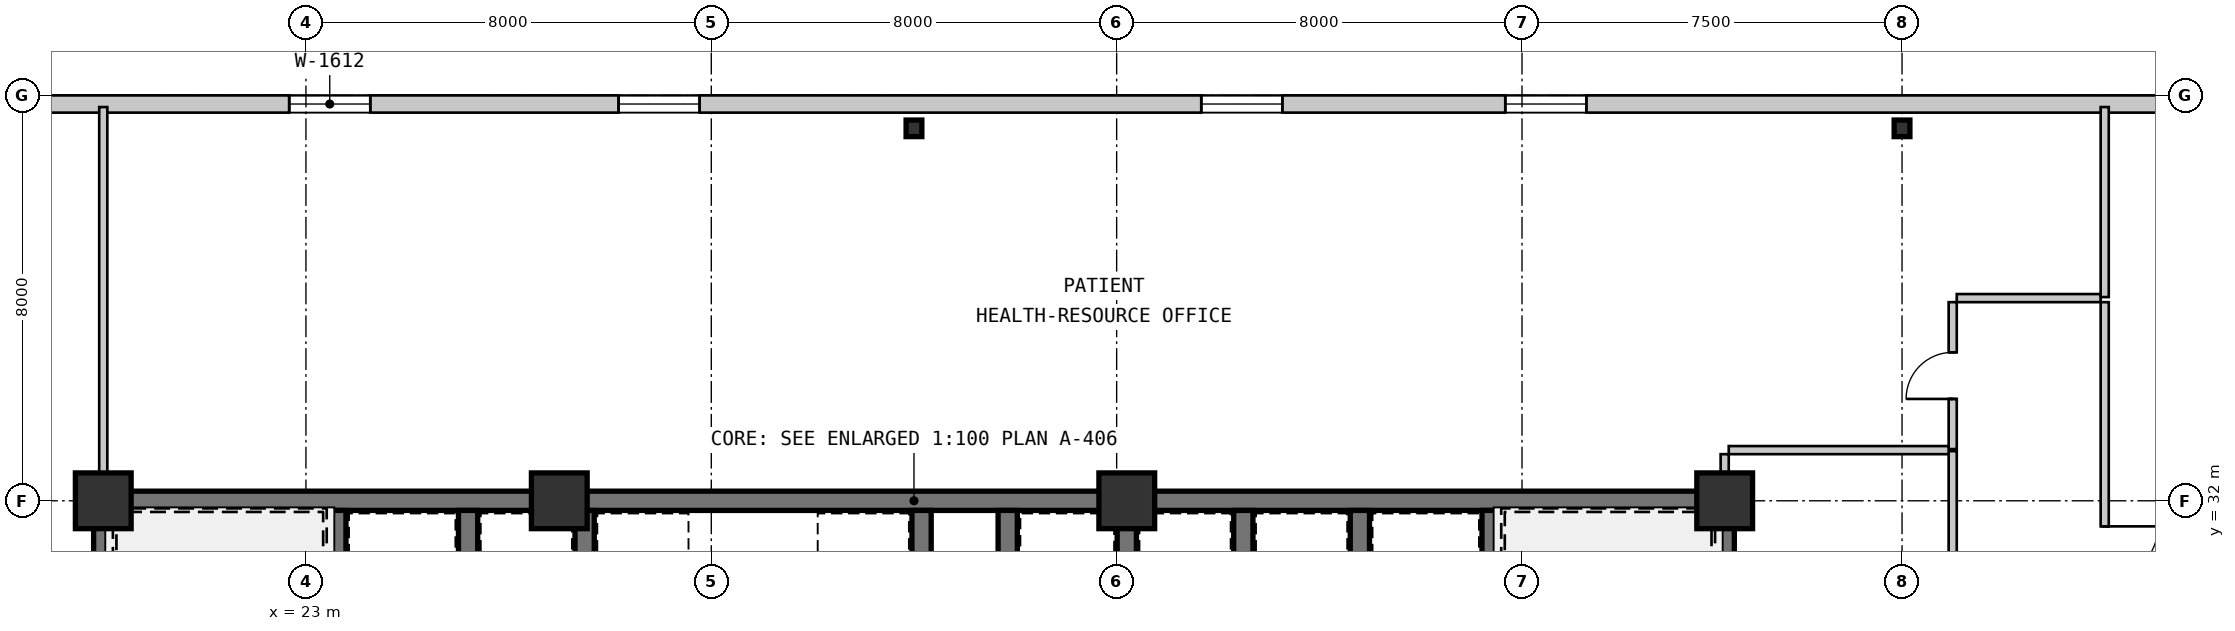
"""IFC4 building model, lengths in metres.
Left out: names, types, materials, properties, quantities, classifications, styles, units other than length and angle.
Written with IfcOpenShell. Run it as: python <this file> out.ifc"""

import sys

from ifc_helpers import new_model, si_unit, direction, frame, frame_2d, origin, origin_2d, place, context, subcontext, project, spatial, rectangle, i_section, extrude, source, transform, mapped, element, fill, save


model = new_model("IFC4")
c1 = context("Model", 3, precision=1e-05, world=origin(), true_north=direction((0.0, 1.0)))
c2 = subcontext(c1, "Body", "Model", "MODEL_VIEW")
j1 = project(units=[si_unit("LENGTHUNIT", "METRE"), si_unit("PLANEANGLEUNIT", "RADIAN")], contexts=[c1])
p1 = place(None, origin())
s1 = spatial("IfcSite", under=j1, at=p1, CompositionType="ELEMENT")
p2 = place(p1, origin())
s2 = spatial("IfcBuilding", under=s1, at=p2, CompositionType="ELEMENT")
p3 = place(p2, frame((0.0, 0.0, 12.95)))
s3 = spatial("IfcBuildingStorey", under=s2, at=p3, CompositionType="ELEMENT", Elevation=12.95)
m1 = source(origin(), c2, "Body", "SweptSolid", [
    extrude(rectangle(XDim=1.1, YDim=1.1, at=origin_2d()), origin(), (0.0, 0.0, 1.0), 3.85),
])
for number, where, z_axis, x_axis in (
    (1, (19.0, 32.0, 0.0), (0.0, 0.0, 1.0), (1.0, 0.0, 0.0)),
    (2, (28.0, 32.0, 0.0), (0.0, 0.0, 1.0), (1.0, 0.0, 0.0)),
    (3, (39.2, 32.0, 0.0), (0.0, 0.0, 1.0), (1.0, 0.0, 0.0)),
    (4, (51.0, 32.0, 0.0), (0.0, 0.0, 1.0), (1.0, 0.0, 0.0)),
):
    element("IfcColumn", number, at=place(p3, frame(where, z_axis=z_axis, x_axis=x_axis)), inside=s3, PredefinedType="COLUMN", context=c2, shape_type="MappedRepresentation", body=[
        mapped(m1, transform((0.0, 0.0, 0.0), scale=1.0)),
    ])
m2 = source(origin(), c2, "Body", "SweptSolid", [
    extrude(i_section(OverallWidth=0.311, OverallDepth=0.327, WebThickness=0.016, FlangeThickness=0.025, at=origin_2d()), origin(), (0.0, 0.0, 1.0), 3.85),
])
for number, where, z_axis, x_axis in (
    (5, (35.0, 39.35, 0.0), (0.0, 0.0, 1.0), (1.0, 0.0, 0.0)),
    (6, (54.5, 39.35, 0.0), (0.0, 0.0, 1.0), (1.0, 0.0, 0.0)),
):
    element("IfcColumn", number, at=place(p3, frame(where, z_axis=z_axis, x_axis=x_axis)), inside=s3, PredefinedType="COLUMN", context=c2, shape_type="MappedRepresentation", body=[
        mapped(m2, transform((0.0, 0.0, 0.0), scale=1.0)),
    ])
m3 = source(origin(), c2, "Body", "SweptSolid", [
    extrude(rectangle(XDim=69.66, YDim=0.34, at=frame_2d((34.83, 0.0))), origin(), (0.0, 0.0, 1.0), 3.43),
])
p4 = place(p3, frame((0.17, 39.83, 0.0), z_axis=(0.0, 0.0, 1.0), x_axis=(1.0, 0.0, 0.0)))
e7 = element("IfcWall", 7, at=p4, inside=s3, PredefinedType="SOLIDWALL", context=c2, shape_type="MappedRepresentation", body=[
    mapped(m3, transform((0.0, 0.0, 0.0), scale=1.0)),
])
m4 = source(origin(), c2, "Body", "SweptSolid", [
    extrude(rectangle(XDim=1.6, YDim=1.2, at=frame_2d((0.8, 0.6))), frame((0.0, 0.18, 0.0), z_axis=(0.0, -1.0, 0.0), x_axis=(1.0, 0.0, 0.0)), (0.0, 0.0, 1.0), 0.36),
])
p5 = place(p4, frame((4.5, 0.0, 0.55)))
e8 = element("IfcOpeningElement", 8, at=p5, cuts=e7, PredefinedType="OPENING", context=c2, shape_type="MappedRepresentation", body=[
    mapped(m4, transform((0.0, 0.0, 0.0), scale=1.0)),
])
p6 = place(p4, frame((22.5, 0.0, 0.55)))
e9 = element("IfcOpeningElement", 9, at=p6, cuts=e7, PredefinedType="OPENING", context=c2, shape_type="MappedRepresentation", body=[
    mapped(m4, transform((0.0, 0.0, 0.0), scale=1.0)),
])
p7 = place(p4, frame((29.0, 0.0, 0.55)))
e10 = element("IfcOpeningElement", 10, at=p7, cuts=e7, PredefinedType="OPENING", context=c2, shape_type="MappedRepresentation", body=[
    mapped(m4, transform((0.0, 0.0, 0.0), scale=1.0)),
])
p8 = place(p4, frame((40.5, 0.0, 0.55)))
e11 = element("IfcOpeningElement", 11, at=p8, cuts=e7, PredefinedType="OPENING", context=c2, shape_type="MappedRepresentation", body=[
    mapped(m4, transform((0.0, 0.0, 0.0), scale=1.0)),
])
p9 = place(p4, frame((46.5, 0.0, 0.55)))
e12 = element("IfcOpeningElement", 12, at=p9, cuts=e7, PredefinedType="OPENING", context=c2, shape_type="MappedRepresentation", body=[
    mapped(m4, transform((0.0, 0.0, 0.0), scale=1.0)),
])
p10 = place(p4, frame((62.5, 0.0, 0.55)))
e13 = element("IfcOpeningElement", 13, at=p10, cuts=e7, PredefinedType="OPENING", context=c2, shape_type="MappedRepresentation", body=[
    mapped(m4, transform((0.0, 0.0, 0.0), scale=1.0)),
])
m5 = source(origin(), c2, "Body", "SweptSolid", [
    extrude(rectangle(XDim=9.19, YDim=0.38, at=frame_2d((4.595, 0.0))), origin(), (0.0, 0.0, 1.0), 3.43),
])
p11 = place(p3, frame((18.81, 32.0, 0.0), z_axis=(0.0, 0.0, 1.0), x_axis=(1.0, 0.0, 0.0)))
e14 = element("IfcWall", 14, at=p11, inside=s3, PredefinedType="SHEAR", context=c2, shape_type="MappedRepresentation", body=[
    mapped(m5, transform((0.0, 0.0, 0.0), scale=1.0)),
])
m6 = source(origin(), c2, "Body", "SweptSolid", [
    extrude(rectangle(XDim=11.2, YDim=0.38, at=frame_2d((5.6, 0.0))), origin(), (0.0, 0.0, 1.0), 3.43),
])
p12 = place(p3, frame((28.0, 32.0, 0.0), z_axis=(0.0, 0.0, 1.0), x_axis=(1.0, 0.0, 0.0)))
e15 = element("IfcWall", 15, at=p12, inside=s3, PredefinedType="SHEAR", context=c2, shape_type="MappedRepresentation", body=[
    mapped(m6, transform((0.0, 0.0, 0.0), scale=1.0)),
])
m7 = source(origin(), c2, "Body", "SweptSolid", [
    extrude(rectangle(XDim=11.99, YDim=0.38, at=frame_2d((5.995, 0.0))), origin(), (0.0, 0.0, 1.0), 3.43),
])
p13 = place(p3, frame((39.2, 32.0, 0.0), z_axis=(0.0, 0.0, 1.0), x_axis=(1.0, 0.0, 0.0)))
e16 = element("IfcWall", 16, at=p13, inside=s3, PredefinedType="SHEAR", context=c2, shape_type="MappedRepresentation", body=[
    mapped(m7, transform((0.0, 0.0, 0.0), scale=1.0)),
])
m8 = source(origin(), c2, "Body", "SweptSolid", [
    extrude(rectangle(XDim=3.61, YDim=0.38, at=frame_2d((1.805, 0.0))), origin(), (0.0, 0.0, 1.0), 3.43),
])
for number, where, z_axis, x_axis in (
    (17, (19.0, 28.2, 0.0), (0.0, 0.0, 1.0), (0.0, 1.0, 0.0)),
    (18, (51.0, 28.2, 0.0), (0.0, 0.0, 1.0), (0.0, 1.0, 0.0)),
):
    element("IfcWall", number, at=place(p3, frame(where, z_axis=z_axis, x_axis=x_axis)), inside=s3, PredefinedType="SHEAR", context=c2, shape_type="MappedRepresentation", body=[
        mapped(m8, transform((0.0, 0.0, 0.0), scale=1.0)),
    ])
m9 = source(origin(), c2, "Body", "SweptSolid", [
    extrude(rectangle(XDim=3.42, YDim=0.38, at=frame_2d((1.71, 0.0))), origin(), (0.0, 0.0, 1.0), 3.43),
])
for number, where, z_axis, x_axis in (
    (19, (23.6, 28.39, 0.0), (0.0, 0.0, 1.0), (0.0, 1.0, 0.0)),
    (20, (26.2, 28.39, 0.0), (0.0, 0.0, 1.0), (0.0, 1.0, 0.0)),
    (21, (46.4, 31.81, 0.0), (0.0, 0.0, 1.0), (0.0, -1.0, 0.0)),
    (22, (43.8, 31.81, 0.0), (0.0, 0.0, 1.0), (0.0, -1.0, 0.0)),
):
    element("IfcWall", number, at=place(p3, frame(where, z_axis=z_axis, x_axis=x_axis)), inside=s3, PredefinedType="SHEAR", context=c2, shape_type="MappedRepresentation", body=[
        mapped(m9, transform((0.0, 0.0, 0.0), scale=1.0)),
    ])
m10 = source(origin(), c2, "Body", "SweptSolid", [
    extrude(rectangle(XDim=1.12, YDim=0.38, at=frame_2d((0.56, 0.0))), origin(), (0.0, 0.0, 1.0), 3.43),
])
for number, where, z_axis, x_axis in (
    (23, (35.15, 31.81, 0.0), (0.0, 0.0, 1.0), (0.0, -1.0, 0.0)),
    (24, (36.85, 30.69, 0.0), (0.0, 0.0, 1.0), (0.0, 1.0, 0.0)),
):
    element("IfcWall", number, at=place(p3, frame(where, z_axis=z_axis, x_axis=x_axis)), inside=s3, PredefinedType="SHEAR", context=c2, shape_type="MappedRepresentation", body=[
        mapped(m10, transform((0.0, 0.0, 0.0), scale=1.0)),
    ])
for number, where, z_axis, x_axis in (
    (25, (28.5, 28.39, 0.0), (0.0, 0.0, 1.0), (0.0, 1.0, 0.0)),
    (26, (39.2, 28.39, 0.0), (0.0, 0.0, 1.0), (0.0, 1.0, 0.0)),
    (27, (41.5, 28.39, 0.0), (0.0, 0.0, 1.0), (0.0, 1.0, 0.0)),
):
    element("IfcWall", number, at=place(p3, frame(where, z_axis=z_axis, x_axis=x_axis)), inside=s3, PredefinedType="SHEAR", context=c2, shape_type="MappedRepresentation", body=[
        mapped(m9, transform((0.0, 0.0, 0.0), scale=1.0)),
    ])
m11 = source(origin(), c2, "Body", "SweptSolid", [
    extrude(rectangle(XDim=9.9, YDim=0.16, at=frame_2d((4.95, 0.0))), origin(), (0.0, 0.0, 1.0), 3.43),
])
p14 = place(p3, frame((58.5, 35.92, 0.0), z_axis=(0.0, 0.0, 1.0), x_axis=(0.0, -1.0, 0.0)))
e28 = element("IfcWall", 28, at=p14, inside=s3, PredefinedType="PARTITIONING", context=c2, shape_type="MappedRepresentation", body=[
    mapped(m11, transform((0.0, 0.0, 0.0), scale=1.0)),
])
m12 = source(origin(), c2, "Body", "SweptSolid", [
    extrude(rectangle(XDim=1.05, YDim=2.1, at=frame_2d((0.525, 1.05))), frame((0.0, 0.09, 0.0), z_axis=(0.0, -1.0, 0.0), x_axis=(1.0, 0.0, 0.0)), (0.0, 0.0, 1.0), 0.18),
])
p15 = place(p14, frame((4.425, 0.0, 0.0)))
e29 = element("IfcOpeningElement", 29, at=p15, cuts=e28, PredefinedType="OPENING", context=c2, shape_type="MappedRepresentation", body=[
    mapped(m12, transform((0.0, 0.0, 0.0), scale=1.0)),
])
m13 = source(origin(), c2, "Body", "SweptSolid", [
    extrude(rectangle(XDim=8.9, YDim=0.16, at=frame_2d((4.45, 0.0))), origin(), (0.0, 0.0, 1.0), 3.43),
])
p16 = place(p3, frame((55.5, 24.08, 0.0), z_axis=(0.0, 0.0, 1.0), x_axis=(0.0, 1.0, 0.0)))
e30 = element("IfcWall", 30, at=p16, inside=s3, PredefinedType="PARTITIONING", context=c2, shape_type="MappedRepresentation", body=[
    mapped(m13, transform((0.0, 0.0, 0.0), scale=1.0)),
])
p17 = place(p16, frame((3.895, 0.0, 0.0)))
e31 = element("IfcOpeningElement", 31, at=p17, cuts=e30, PredefinedType="OPENING", context=c2, shape_type="MappedRepresentation", body=[
    mapped(m12, transform((0.0, 0.0, 0.0), scale=1.0)),
])
m14 = source(origin(), c2, "Body", "SweptSolid", [
    extrude(rectangle(XDim=2.9, YDim=0.16, at=frame_2d((1.45, 0.0))), origin(), (0.0, 0.0, 1.0), 3.43),
])
p18 = place(p3, frame((55.5, 33.02, 0.0), z_axis=(0.0, 0.0, 1.0), x_axis=(0.0, 1.0, 0.0)))
e32 = element("IfcWall", 32, at=p18, inside=s3, PredefinedType="PARTITIONING", context=c2, shape_type="MappedRepresentation", body=[
    mapped(m14, transform((0.0, 0.0, 0.0), scale=1.0)),
])
m15 = source(origin(), c2, "Body", "SweptSolid", [
    extrude(rectangle(XDim=0.92, YDim=2.1, at=frame_2d((0.46, 1.05))), frame((0.0, 0.09, 0.0), z_axis=(0.0, -1.0, 0.0), x_axis=(1.0, 0.0, 0.0)), (0.0, 0.0, 1.0), 0.18),
])
p19 = place(p18, frame((0.99, 0.0, 0.0)))
e33 = element("IfcOpeningElement", 33, at=p19, cuts=e32, PredefinedType="OPENING", context=c2, shape_type="MappedRepresentation", body=[
    mapped(m15, transform((0.0, 0.0, 0.0), scale=1.0)),
])
m16 = source(origin(), c2, "Body", "SweptSolid", [
    extrude(rectangle(XDim=2.84, YDim=0.16, at=frame_2d((1.42, 0.0))), origin(), (0.0, 0.0, 1.0), 3.43),
])
p20 = place(p3, frame((55.58, 36.0, 0.0), z_axis=(0.0, 0.0, 1.0), x_axis=(1.0, 0.0, 0.0)))
e34 = element("IfcWall", 34, at=p20, inside=s3, PredefinedType="PARTITIONING", context=c2, shape_type="MappedRepresentation", body=[
    mapped(m16, transform((0.0, 0.0, 0.0), scale=1.0)),
])
m17 = source(origin(), c2, "Body", "SweptSolid", [
    extrude(rectangle(XDim=7.58, YDim=0.16, at=frame_2d((3.79, 0.0))), origin(), (0.0, 0.0, 1.0), 3.43),
])
p21 = place(p3, frame((19.0, 39.77, 0.0), z_axis=(0.0, 0.0, 1.0), x_axis=(0.0, -1.0, 0.0)))
e35 = element("IfcWall", 35, at=p21, inside=s3, PredefinedType="PARTITIONING", context=c2, shape_type="MappedRepresentation", body=[
    mapped(m17, transform((0.0, 0.0, 0.0), scale=1.0)),
])
m18 = source(origin(), c2, "Body", "SweptSolid", [
    extrude(rectangle(XDim=3.75, YDim=0.16, at=frame_2d((1.875, 0.0))), origin(), (0.0, 0.0, 1.0), 3.43),
])
p22 = place(p3, frame((58.5, 36.02, 0.0), z_axis=(0.0, 0.0, 1.0), x_axis=(0.0, 1.0, 0.0)))
e36 = element("IfcWall", 36, at=p22, inside=s3, PredefinedType="PARTITIONING", context=c2, shape_type="MappedRepresentation", body=[
    mapped(m18, transform((0.0, 0.0, 0.0), scale=1.0)),
])
m19 = source(origin(), c2, "Body", "SweptSolid", [
    extrude(rectangle(XDim=4.34, YDim=0.16, at=frame_2d((2.17, 0.0))), origin(), (0.0, 0.0, 1.0), 3.43),
])
p23 = place(p3, frame((51.08, 33.0, 0.0), z_axis=(0.0, 0.0, 1.0), x_axis=(1.0, 0.0, 0.0)))
e37 = element("IfcWall", 37, at=p23, inside=s3, PredefinedType="PARTITIONING", context=c2, shape_type="MappedRepresentation", body=[
    mapped(m19, transform((0.0, 0.0, 0.0), scale=1.0)),
])
m20 = source(origin(), c2, "Body", "SweptSolid", [
    extrude(rectangle(XDim=0.73, YDim=0.16, at=frame_2d((0.365, 0.0))), origin(), (0.0, 0.0, 1.0), 3.43),
])
p24 = place(p3, frame((51.0, 32.19, 0.0), z_axis=(0.0, 0.0, 1.0), x_axis=(0.0, 1.0, 0.0)))
e38 = element("IfcWall", 38, at=p24, inside=s3, PredefinedType="PARTITIONING", context=c2, shape_type="MappedRepresentation", body=[
    mapped(m20, transform((0.0, 0.0, 0.0), scale=1.0)),
])
m21 = source(origin(), c2, "Body", "SweptSolid", [
    extrude(rectangle(XDim=1.6, YDim=1.2, at=frame_2d((0.8, 0.6))), frame((0.0, 0.03, 0.0), z_axis=(0.0, -1.0, 0.0), x_axis=(1.0, 0.0, 0.0)), (0.0, 0.0, 1.0), 0.06),
])
p25 = place(p6, origin())
e39 = element("IfcWindow", 39, at=p25, inside=s3, PartitioningType="SINGLE_PANEL", PredefinedType="WINDOW", context=c2, shape_type="MappedRepresentation", body=[
    mapped(m21, transform((0.0, 0.0, 0.0), scale=1.0)),
])
fill(e9, e39)
p26 = place(p7, origin())
e40 = element("IfcWindow", 40, at=p26, inside=s3, PartitioningType="SINGLE_PANEL", PredefinedType="WINDOW", context=c2, shape_type="MappedRepresentation", body=[
    mapped(m21, transform((0.0, 0.0, 0.0), scale=1.0)),
])
fill(e10, e40)
p27 = place(p8, origin())
e41 = element("IfcWindow", 41, at=p27, inside=s3, PartitioningType="SINGLE_PANEL", PredefinedType="WINDOW", context=c2, shape_type="MappedRepresentation", body=[
    mapped(m21, transform((0.0, 0.0, 0.0), scale=1.0)),
])
fill(e11, e41)
p28 = place(p9, origin())
e42 = element("IfcWindow", 42, at=p28, inside=s3, PartitioningType="SINGLE_PANEL", PredefinedType="WINDOW", context=c2, shape_type="MappedRepresentation", body=[
    mapped(m21, transform((0.0, 0.0, 0.0), scale=1.0)),
])
fill(e12, e42)
m22 = source(origin(), c2, "Body", "SweptSolid", [
    extrude(rectangle(XDim=1.05, YDim=2.1, at=frame_2d((0.525, 1.05))), frame((0.0, 0.025, 0.0), z_axis=(0.0, -1.0, 0.0), x_axis=(1.0, 0.0, 0.0)), (0.0, 0.0, 1.0), 0.05),
])
p29 = place(p15, origin())
e43 = element("IfcDoor", 43, at=p29, inside=s3, OperationType="SINGLE_SWING_LEFT", PredefinedType="DOOR", context=c2, shape_type="MappedRepresentation", body=[
    mapped(m22, transform((0.0, 0.0, 0.0), scale=1.0)),
])
fill(e29, e43)
m23 = source(origin(), c2, "Body", "SweptSolid", [
    extrude(rectangle(XDim=0.92, YDim=2.1, at=frame_2d((0.46, 1.05))), frame((0.0, 0.025, 0.0), z_axis=(0.0, -1.0, 0.0), x_axis=(1.0, 0.0, 0.0)), (0.0, 0.0, 1.0), 0.05),
])
p30 = place(p19, origin())
e44 = element("IfcDoor", 44, at=p30, inside=s3, OperationType="SINGLE_SWING_LEFT", PredefinedType="DOOR", context=c2, shape_type="MappedRepresentation", body=[
    mapped(m23, transform((0.0, 0.0, 0.0), scale=1.0)),
])
fill(e33, e44)
save(model, sys.argv[1])
